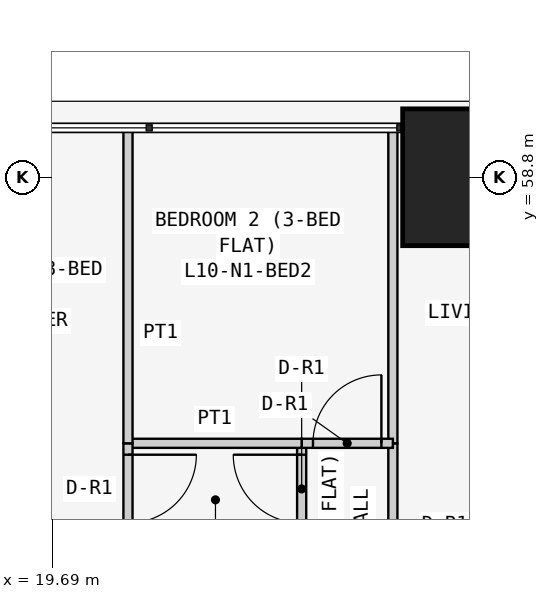
"""IFC4 building model, lengths in metres.
Left out: names, types, materials, properties, quantities, classifications, styles, units other than length and angle.
Written with IfcOpenShell. Run it as: python <this file> out.ifc"""

import sys

from ifc_helpers import new_model, si_unit, direction, frame, frame_2d, origin, origin_2d, place, context, subcontext, project, spatial, rectangle, extrude, element, fill, save


model = new_model("IFC4")
c1 = context("Model", 3, precision=1e-05, world=origin(), true_north=direction((0.0, 1.0)))
c2 = subcontext(c1, "Body", "Model", "MODEL_VIEW")
j1 = project(units=[si_unit("LENGTHUNIT", "METRE"), si_unit("PLANEANGLEUNIT", "RADIAN")], contexts=[c1])
p1 = place(None, origin())
s1 = spatial("IfcSite", under=j1, at=p1, CompositionType="ELEMENT")
p2 = place(p1, origin())
s2 = spatial("IfcBuilding", under=s1, at=p2, CompositionType="ELEMENT")
p3 = place(p2, frame((0.0, 0.0, 45.3)))
s3 = spatial("IfcBuildingStorey", under=s2, at=p3, CompositionType="ELEMENT", Elevation=45.3)
p4 = place(p3, frame((25.2, 58.8, 0.0), z_axis=(0.0, 0.0, 1.0), x_axis=(1.0, 0.0, 0.0)))
e1 = element("IfcColumn", 1, at=p4, inside=s3, PredefinedType="COLUMN", context=c2, shape_type="SweptSolid", body=[
    extrude(rectangle(XDim=1.8, YDim=1.8, at=origin_2d()), origin(), (0.0, 0.0, 1.0), 3.6),
])
p5 = place(p3, frame((24.171, 55.3, 0.0), z_axis=(0.0, 0.0, 1.0), x_axis=(0.0, -1.0, 0.0)))
e2 = element("IfcWall", 2, at=p5, inside=s3, PredefinedType="PARTITIONING", context=c2, shape_type="SweptSolid", body=[
    extrude(rectangle(XDim=4.9, YDim=0.12, at=frame_2d((2.45, 0.0))), origin(), (0.0, 0.0, 1.0), 3.45),
])
p6 = place(p5, frame((1.25, 0.0, 0.0)))
e3 = element("IfcOpeningElement", 3, at=p6, cuts=e2, PredefinedType="OPENING", context=c2, shape_type="SweptSolid", body=[
    extrude(rectangle(XDim=0.9, YDim=2.1, at=frame_2d((0.45, 1.05))), frame((0.0, 0.07, 0.0), z_axis=(0.0, -1.0, 0.0), x_axis=(1.0, 0.0, 0.0)), (0.0, 0.0, 1.0), 0.14),
])
p7 = place(p3, frame((24.171, 59.45, 0.0), z_axis=(0.0, 0.0, 1.0), x_axis=(0.0, -1.0, 0.0)))
e4 = element("IfcWall", 4, at=p7, inside=s3, PredefinedType="PARTITIONING", context=c2, shape_type="SweptSolid", body=[
    extrude(rectangle(XDim=4.15, YDim=0.12, at=frame_2d((2.075, 0.0))), origin(), (0.0, 0.0, 1.0), 3.45),
])
p8 = place(p3, frame((22.971, 55.3, 0.0), z_axis=(0.0, 0.0, 1.0), x_axis=(0.0, -1.0, 0.0)))
e5 = element("IfcWall", 5, at=p8, inside=s3, PredefinedType="PARTITIONING", context=c2, shape_type="SweptSolid", body=[
    extrude(rectangle(XDim=1.2, YDim=0.12, at=frame_2d((0.6, 0.0))), origin(), (0.0, 0.0, 1.0), 3.45),
])
p9 = place(p8, frame((0.15, 0.0, 0.0)))
e6 = element("IfcOpeningElement", 6, at=p9, cuts=e5, PredefinedType="OPENING", context=c2, shape_type="SweptSolid", body=[
    extrude(rectangle(XDim=0.9, YDim=2.1, at=frame_2d((0.45, 1.05))), frame((0.0, 0.07, 0.0), z_axis=(0.0, -1.0, 0.0), x_axis=(1.0, 0.0, 0.0)), (0.0, 0.0, 1.0), 0.14),
])
p10 = place(p3, frame((24.171, 55.3, 0.0), z_axis=(0.0, 0.0, 1.0), x_axis=(-1.0, 0.0, 0.0)))
e7 = element("IfcWall", 7, at=p10, inside=s3, PredefinedType="PARTITIONING", context=c2, shape_type="SweptSolid", body=[
    extrude(rectangle(XDim=1.2, YDim=0.12, at=frame_2d((0.6, 0.0))), origin(), (0.0, 0.0, 1.0), 3.45),
])
p11 = place(p10, frame((0.151, 0.0, 0.0)))
e8 = element("IfcOpeningElement", 8, at=p11, cuts=e7, PredefinedType="OPENING", context=c2, shape_type="SweptSolid", body=[
    extrude(rectangle(XDim=0.9, YDim=2.1, at=frame_2d((0.45, 1.05))), frame((0.0, 0.07, 0.0), z_axis=(0.0, -1.0, 0.0), x_axis=(1.0, 0.0, 0.0)), (0.0, 0.0, 1.0), 0.14),
])
p12 = place(p3, frame((22.971, 55.3, 0.0), z_axis=(0.0, 0.0, 1.0), x_axis=(-1.0, 0.0, 0.0)))
e9 = element("IfcWall", 9, at=p12, inside=s3, PredefinedType="PARTITIONING", context=c2, shape_type="SweptSolid", body=[
    extrude(rectangle(XDim=2.285, YDim=0.12, at=frame_2d((1.143, 0.0))), origin(), (0.0, 0.0, 1.0), 3.45),
])
p13 = place(p3, frame((20.686, 55.3, 0.0), z_axis=(0.0, 0.0, 1.0), x_axis=(0.0, -1.0, 0.0)))
e10 = element("IfcWall", 10, at=p13, inside=s3, PredefinedType="PARTITIONING", context=c2, shape_type="SweptSolid", body=[
    extrude(rectangle(XDim=1.2, YDim=0.12, at=frame_2d((0.6, 0.0))), origin(), (0.0, 0.0, 1.0), 3.45),
])
p14 = place(p13, frame((0.15, 0.0, 0.0)))
e11 = element("IfcOpeningElement", 11, at=p14, cuts=e10, PredefinedType="OPENING", context=c2, shape_type="SweptSolid", body=[
    extrude(rectangle(XDim=0.9, YDim=2.1, at=frame_2d((0.45, 1.05))), frame((0.0, 0.07, 0.0), z_axis=(0.0, -1.0, 0.0), x_axis=(1.0, 0.0, 0.0)), (0.0, 0.0, 1.0), 0.14),
])
p15 = place(p3, frame((20.686, 59.45, 0.0), z_axis=(0.0, 0.0, 1.0), x_axis=(0.0, -1.0, 0.0)))
e12 = element("IfcWall", 12, at=p15, inside=s3, PredefinedType="PARTITIONING", context=c2, shape_type="SweptSolid", body=[
    extrude(rectangle(XDim=4.15, YDim=0.12, at=frame_2d((2.075, 0.0))), origin(), (0.0, 0.0, 1.0), 3.45),
])
p16 = place(p9, frame((0.9, 0.0, 0.0), z_axis=(0.0, 0.0, 1.0), x_axis=(-1.0, 0.0, 0.0)))
e13 = element("IfcDoor", 13, at=p16, inside=s3, OperationType="SINGLE_SWING_RIGHT", PredefinedType="DOOR", context=c2, shape_type="SweptSolid", body=[
    extrude(rectangle(XDim=0.9, YDim=2.1, at=frame_2d((0.45, 1.05))), frame((0.0, 0.025, 0.0), z_axis=(0.0, -1.0, 0.0), x_axis=(1.0, 0.0, 0.0)), (0.0, 0.0, 1.0), 0.05),
])
fill(e6, e13)
p17 = place(p14, origin())
e14 = element("IfcDoor", 14, at=p17, inside=s3, OperationType="SINGLE_SWING_LEFT", PredefinedType="DOOR", context=c2, shape_type="SweptSolid", body=[
    extrude(rectangle(XDim=0.9, YDim=2.1, at=frame_2d((0.45, 1.05))), frame((0.0, 0.025, 0.0), z_axis=(0.0, -1.0, 0.0), x_axis=(1.0, 0.0, 0.0)), (0.0, 0.0, 1.0), 0.05),
])
fill(e11, e14)
p18 = place(p11, frame((0.9, 0.0, 0.0), z_axis=(0.0, 0.0, 1.0), x_axis=(-1.0, 0.0, 0.0)))
e15 = element("IfcDoor", 15, at=p18, inside=s3, OperationType="SINGLE_SWING_RIGHT", PredefinedType="DOOR", context=c2, shape_type="SweptSolid", body=[
    extrude(rectangle(XDim=0.9, YDim=2.1, at=frame_2d((0.45, 1.05))), frame((0.0, 0.025, 0.0), z_axis=(0.0, -1.0, 0.0), x_axis=(1.0, 0.0, 0.0)), (0.0, 0.0, 1.0), 0.05),
])
fill(e8, e15)
save(model, sys.argv[1])
